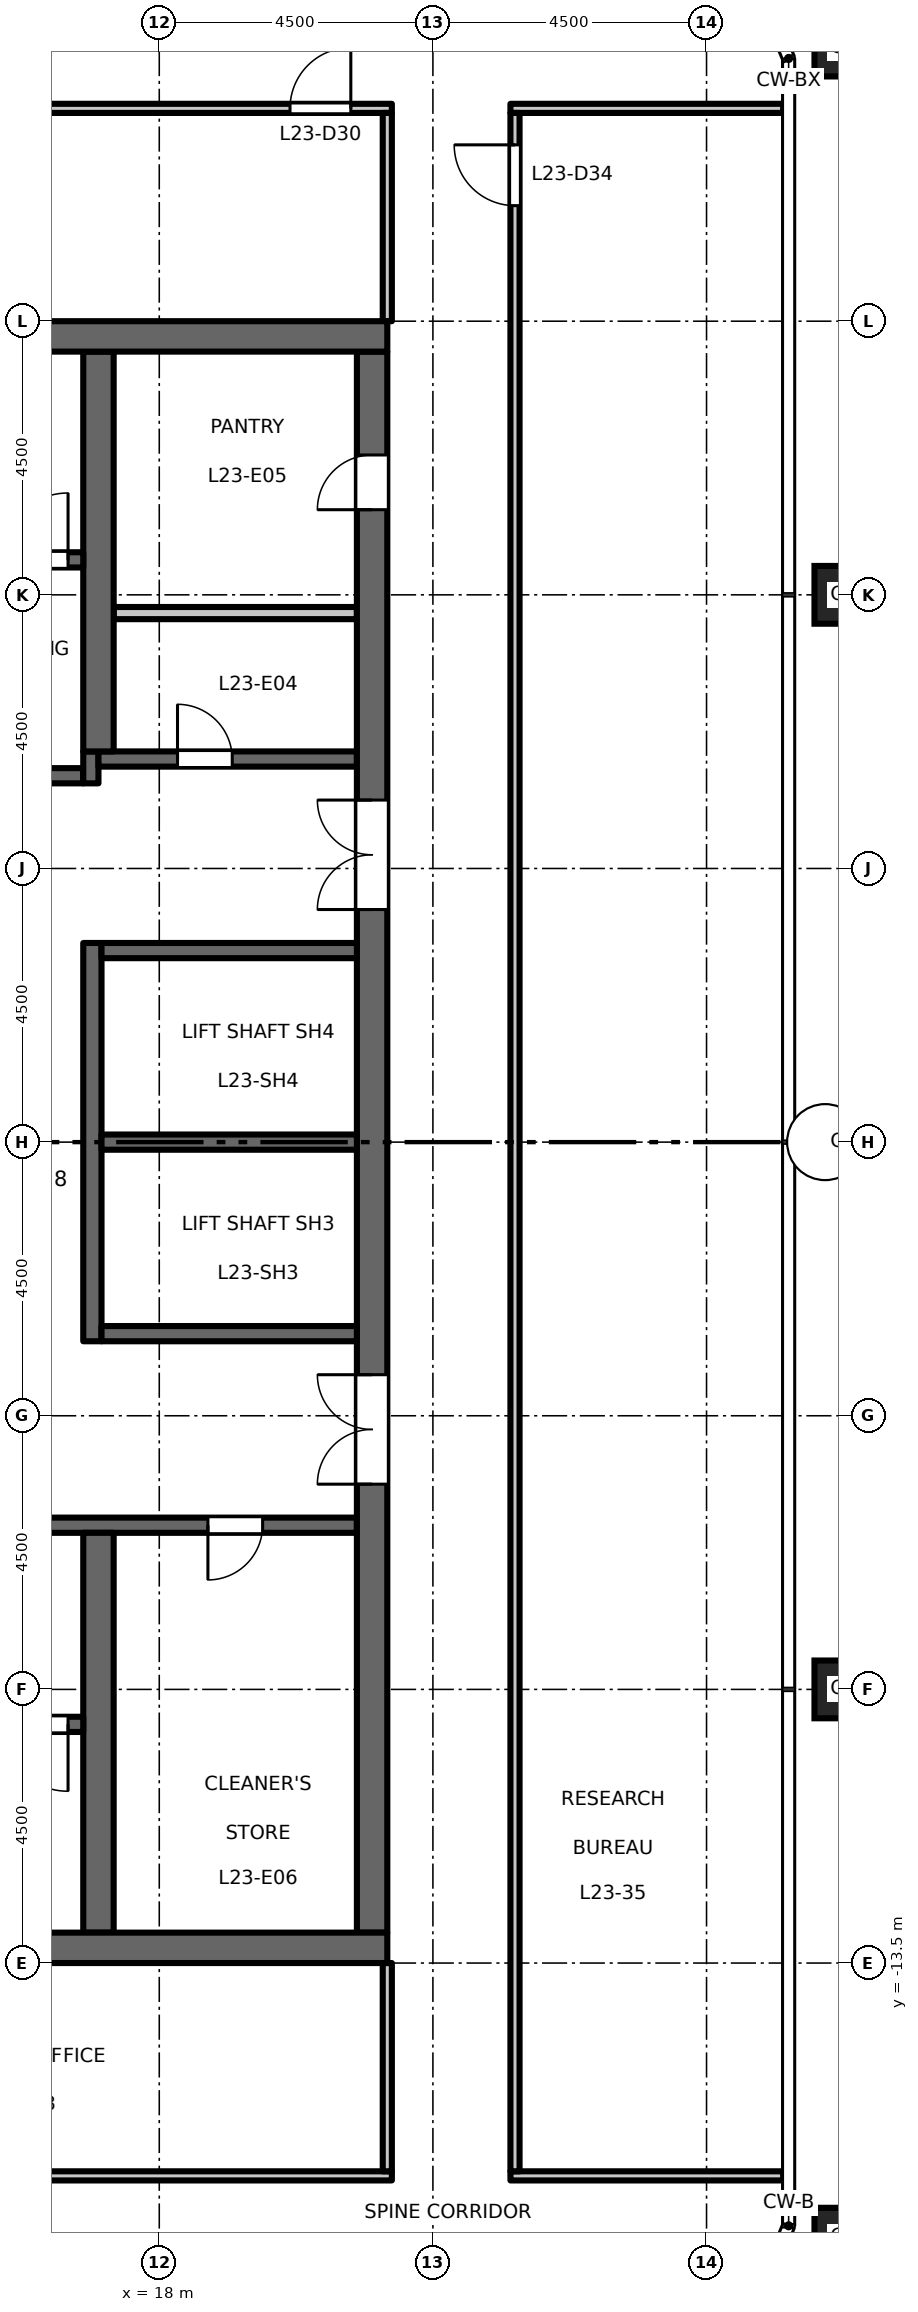
"""IFC4 building model, lengths in metres.
Left out: names, types, materials, properties, quantities, classifications, styles, units other than length and angle.
Written with IfcOpenShell. Run it as: python <this file> out.ifc"""

import sys

from ifc_helpers import new_model, si_unit, direction, frame, frame_2d, origin, origin_2d, place, context, subcontext, project, spatial, rectangle, hollow_rectangle, extrude, element, fill, save


model = new_model("IFC4")
c1 = context("Model", 3, precision=1e-05, world=origin(), true_north=direction((0.0, 1.0)))
c2 = subcontext(c1, "Body", "Model", "MODEL_VIEW")
j1 = project(units=[si_unit("LENGTHUNIT", "METRE"), si_unit("PLANEANGLEUNIT", "RADIAN")], contexts=[c1])
p1 = place(None, origin())
s1 = spatial("IfcSite", under=j1, at=p1, CompositionType="ELEMENT")
p2 = place(p1, origin())
s2 = spatial("IfcBuilding", under=s1, at=p2, CompositionType="ELEMENT")
p3 = place(p2, frame((0.0, 0.0, 109.2)))
s3 = spatial("IfcBuildingStorey", under=s2, at=p3, CompositionType="ELEMENT", Elevation=109.2)
for number, where, z_axis, x_axis in (
    (1, (29.25, -18.0, 0.0), (0.0, 0.0, 1.0), (1.0, 0.0, 0.0)),
    (2, (29.25, -9.0, 0.0), (0.0, 0.0, 1.0), (1.0, 0.0, 0.0)),
    (3, (29.25, 0.0, 0.0), (0.0, 0.0, 1.0), (1.0, 0.0, 0.0)),
    (4, (29.25, 9.0, 0.0), (0.0, 0.0, 1.0), (1.0, 0.0, 0.0)),
    (5, (29.25, 18.0, 0.0), (0.0, 0.0, 1.0), (1.0, 0.0, 0.0)),
):
    element("IfcColumn", number, at=place(p3, frame(where, z_axis=z_axis, x_axis=x_axis)), inside=s3, PredefinedType="COLUMN", context=c2, shape_type="SweptSolid", body=[
        extrude(hollow_rectangle(XDim=0.95, YDim=0.95, WallThickness=0.055, at=origin_2d()), origin(), (0.0, 0.0, 1.0), 4.5),
    ])
p4 = place(p3, frame((12.15, 6.025, 0.0), z_axis=(0.0, 0.0, 1.0), x_axis=(1.0, 0.0, 0.0)))
e6 = element("IfcWall", 6, at=p4, inside=s3, PredefinedType="SHEAR", context=c2, shape_type="SweptSolid", body=[
    extrude(rectangle(XDim=4.6, YDim=0.25, at=frame_2d((2.3, 0.0))), origin(), (0.0, 0.0, 1.0), 4.35),
])
p5 = place(p4, frame((1.8, 0.0, 0.0)))
e7 = element("IfcOpeningElement", 7, at=p5, cuts=e6, PredefinedType="OPENING", context=c2, shape_type="SweptSolid", body=[
    extrude(rectangle(XDim=1.0, YDim=2.1, at=frame_2d((0.5, 1.05))), frame((0.0, 0.135, 0.0), z_axis=(0.0, -1.0, 0.0), x_axis=(1.0, 0.0, 0.0)), (0.0, 0.0, 1.0), 0.27),
])
p6 = place(p3, frame((16.875, 5.9, 0.0), z_axis=(0.0, 0.0, 1.0), x_axis=(0.0, 1.0, 0.0)))
e8 = element("IfcWall", 8, at=p6, inside=s3, PredefinedType="SHEAR", context=c2, shape_type="SweptSolid", body=[
    extrude(rectangle(XDim=0.525, YDim=0.25, at=frame_2d((0.263, 0.0))), origin(), (0.0, 0.0, 1.0), 4.35),
])
p7 = place(p3, frame((17.0, 6.3, 0.0), z_axis=(0.0, 0.0, 1.0), x_axis=(1.0, 0.0, 0.0)))
e9 = element("IfcWall", 9, at=p7, inside=s3, PredefinedType="SHEAR", context=c2, shape_type="SweptSolid", body=[
    extrude(rectangle(XDim=4.25, YDim=0.25, at=frame_2d((2.125, 0.0))), origin(), (0.0, 0.0, 1.0), 4.35),
])
p8 = place(p7, frame((1.3, 0.0, 0.0)))
e10 = element("IfcOpeningElement", 10, at=p8, cuts=e9, PredefinedType="OPENING", context=c2, shape_type="SweptSolid", body=[
    extrude(rectangle(XDim=0.9, YDim=2.1, at=frame_2d((0.45, 1.05))), frame((0.0, 0.135, 0.0), z_axis=(0.0, -1.0, 0.0), x_axis=(1.0, 0.0, 0.0)), (0.0, 0.0, 1.0), 0.27),
])
p9 = place(p3, frame((12.15, -6.3, 0.0), z_axis=(0.0, 0.0, 1.0), x_axis=(1.0, 0.0, 0.0)))
e11 = element("IfcWall", 11, at=p9, inside=s3, PredefinedType="SHEAR", context=c2, shape_type="SweptSolid", body=[
    extrude(rectangle(XDim=9.1, YDim=0.25, at=frame_2d((4.55, 0.0))), origin(), (0.0, 0.0, 1.0), 4.35),
])
p10 = place(p9, frame((1.8, 0.0, 0.0)))
e12 = element("IfcOpeningElement", 12, at=p10, cuts=e11, PredefinedType="OPENING", context=c2, shape_type="SweptSolid", body=[
    extrude(rectangle(XDim=1.0, YDim=2.1, at=frame_2d((0.5, 1.05))), frame((0.0, 0.135, 0.0), z_axis=(0.0, -1.0, 0.0), x_axis=(1.0, 0.0, 0.0)), (0.0, 0.0, 1.0), 0.27),
])
p11 = place(p9, frame((6.65, 0.0, 0.0)))
e13 = element("IfcOpeningElement", 13, at=p11, cuts=e11, PredefinedType="OPENING", context=c2, shape_type="SweptSolid", body=[
    extrude(rectangle(XDim=0.9, YDim=2.1, at=frame_2d((0.45, 1.05))), frame((0.0, 0.135, 0.0), z_axis=(0.0, -1.0, 0.0), x_axis=(1.0, 0.0, 0.0)), (0.0, 0.0, 1.0), 0.27),
])
p12 = place(p3, frame((21.5, -13.0, 0.0), z_axis=(0.0, 0.0, 1.0), x_axis=(0.0, 1.0, 0.0)))
e14 = element("IfcWall", 14, at=p12, inside=s3, PredefinedType="SHEAR", context=c2, shape_type="SweptSolid", body=[
    extrude(rectangle(XDim=26.0, YDim=0.5, at=frame_2d((13.0, 0.0))), origin(), (0.0, 0.0, 1.0), 4.35),
])
p13 = place(p12, frame((16.825, 0.0, 0.0)))
e15 = element("IfcOpeningElement", 15, at=p13, cuts=e14, PredefinedType="OPENING", context=c2, shape_type="SweptSolid", body=[
    extrude(rectangle(XDim=1.8, YDim=2.1, at=frame_2d((0.9, 1.05))), frame((0.0, 0.26, 0.0), z_axis=(0.0, -1.0, 0.0), x_axis=(1.0, 0.0, 0.0)), (0.0, 0.0, 1.0), 0.52),
])
p14 = place(p12, frame((7.375, 0.0, 0.0)))
e16 = element("IfcOpeningElement", 16, at=p14, cuts=e14, PredefinedType="OPENING", context=c2, shape_type="SweptSolid", body=[
    extrude(rectangle(XDim=1.8, YDim=2.1, at=frame_2d((0.9, 1.05))), frame((0.0, 0.26, 0.0), z_axis=(0.0, -1.0, 0.0), x_axis=(1.0, 0.0, 0.0)), (0.0, 0.0, 1.0), 0.52),
])
p15 = place(p12, frame((23.4, 0.0, 0.0)))
e17 = element("IfcOpeningElement", 17, at=p15, cuts=e14, PredefinedType="OPENING", context=c2, shape_type="SweptSolid", body=[
    extrude(rectangle(XDim=0.9, YDim=2.1, at=frame_2d((0.45, 1.05))), frame((0.0, 0.26, 0.0), z_axis=(0.0, -1.0, 0.0), x_axis=(1.0, 0.0, 0.0)), (0.0, 0.0, 1.0), 0.52),
])
p16 = place(p3, frame((17.25, 8.7, 0.0), z_axis=(0.0, 0.0, 1.0), x_axis=(1.0, 0.0, 0.0)))
e18 = element("IfcWall", 18, at=p16, inside=s3, PredefinedType="PARTITIONING", context=c2, shape_type="SweptSolid", body=[
    extrude(rectangle(XDim=4.0, YDim=0.2, at=frame_2d((2.0, 0.0))), origin(), (0.0, 0.0, 1.0), 4.35),
])
p17 = place(p3, frame((16.9, -3.275, 0.0), z_axis=(0.0, 0.0, 1.0), x_axis=(0.0, 1.0, 0.0)))
e19 = element("IfcWall", 19, at=p17, inside=s3, PredefinedType="SHEAR", context=c2, shape_type="SweptSolid", body=[
    extrude(rectangle(XDim=6.55, YDim=0.3, at=frame_2d((3.275, 0.0))), origin(), (0.0, 0.0, 1.0), 4.35),
])
for number, where, z_axis, x_axis in (
    (20, (17.05, 0.0, 0.0), (0.0, 0.0, 1.0), (1.0, 0.0, 0.0)),
    (21, (17.05, 3.15, 0.0), (0.0, 0.0, 1.0), (1.0, 0.0, 0.0)),
    (22, (17.05, -3.15, 0.0), (0.0, 0.0, 1.0), (1.0, 0.0, 0.0)),
):
    element("IfcWall", number, at=place(p3, frame(where, z_axis=z_axis, x_axis=x_axis)), inside=s3, PredefinedType="SHEAR", context=c2, shape_type="SweptSolid", body=[
        extrude(rectangle(XDim=4.2, YDim=0.25, at=frame_2d((2.1, 0.0))), origin(), (0.0, 0.0, 1.0), 4.35),
    ])
for number, where, z_axis, x_axis in (
    (23, (17.0, 6.425, 0.0), (0.0, 0.0, 1.0), (0.0, 1.0, 0.0)),
    (24, (17.0, -13.0, 0.0), (0.0, 0.0, 1.0), (0.0, 1.0, 0.0)),
):
    element("IfcWall", number, at=place(p3, frame(where, z_axis=z_axis, x_axis=x_axis)), inside=s3, PredefinedType="SHEAR", context=c2, shape_type="SweptSolid", body=[
        extrude(rectangle(XDim=6.575, YDim=0.5, at=frame_2d((3.288, 0.0))), origin(), (0.0, 0.0, 1.0), 4.35),
    ])
p18 = place(p3, frame((8.75, 9.575, 0.0), z_axis=(0.0, 0.0, 1.0), x_axis=(1.0, 0.0, 0.0)))
e25 = element("IfcWall", 25, at=p18, inside=s3, PredefinedType="SHEAR", context=c2, shape_type="SweptSolid", body=[
    extrude(rectangle(XDim=8.0, YDim=0.25, at=frame_2d((4.0, 0.0))), origin(), (0.0, 0.0, 1.0), 4.35),
])
p19 = place(p18, frame((6.65, 0.0, 0.0)))
e26 = element("IfcOpeningElement", 26, at=p19, cuts=e25, PredefinedType="OPENING", context=c2, shape_type="SweptSolid", body=[
    extrude(rectangle(XDim=1.1, YDim=2.1, at=frame_2d((0.55, 1.05))), frame((0.0, 0.135, 0.0), z_axis=(0.0, -1.0, 0.0), x_axis=(1.0, 0.0, 0.0)), (0.0, 0.0, 1.0), 0.27),
])
p20 = place(p3, frame((8.75, -9.575, 0.0), z_axis=(0.0, 0.0, 1.0), x_axis=(1.0, 0.0, 0.0)))
e27 = element("IfcWall", 27, at=p20, inside=s3, PredefinedType="SHEAR", context=c2, shape_type="SweptSolid", body=[
    extrude(rectangle(XDim=8.0, YDim=0.25, at=frame_2d((4.0, 0.0))), origin(), (0.0, 0.0, 1.0), 4.35),
])
p21 = place(p20, frame((6.65, 0.0, 0.0)))
e28 = element("IfcOpeningElement", 28, at=p21, cuts=e27, PredefinedType="OPENING", context=c2, shape_type="SweptSolid", body=[
    extrude(rectangle(XDim=1.1, YDim=2.1, at=frame_2d((0.55, 1.05))), frame((0.0, 0.135, 0.0), z_axis=(0.0, -1.0, 0.0), x_axis=(1.0, 0.0, 0.0)), (0.0, 0.0, 1.0), 0.27),
])
for number, where, z_axis, x_axis in (
    (29, (8.25, 13.25, 0.0), (0.0, 0.0, 1.0), (1.0, 0.0, 0.0)),
    (30, (8.25, -13.25, 0.0), (0.0, 0.0, 1.0), (1.0, 0.0, 0.0)),
):
    element("IfcWall", number, at=place(p3, frame(where, z_axis=z_axis, x_axis=x_axis)), inside=s3, PredefinedType="SHEAR", context=c2, shape_type="SweptSolid", body=[
        extrude(rectangle(XDim=13.5, YDim=0.5, at=frame_2d((6.75, 0.0))), origin(), (0.0, 0.0, 1.0), 4.35),
    ])
p22 = place(p3, frame((-21.825, -17.0, 0.0), z_axis=(0.0, 0.0, 1.0), x_axis=(1.0, 0.0, 0.0)))
e31 = element("IfcWall", 31, at=p22, inside=s3, PredefinedType="PARTITIONING", context=c2, shape_type="SweptSolid", body=[
    extrude(rectangle(XDim=43.65, YDim=0.15, at=frame_2d((21.825, 0.0))), origin(), (0.0, 0.0, 1.0), 4.35),
])
p23 = place(p22, frame((14.175, 0.0, 0.0)))
e32 = element("IfcOpeningElement", 32, at=p23, cuts=e31, PredefinedType="OPENING", context=c2, shape_type="SweptSolid", body=[
    extrude(rectangle(XDim=1.0, YDim=2.1, at=frame_2d((0.5, 1.05))), frame((0.0, 0.085, 0.0), z_axis=(0.0, -1.0, 0.0), x_axis=(1.0, 0.0, 0.0)), (0.0, 0.0, 1.0), 0.17),
])
p24 = place(p22, frame((11.925, 0.0, 0.0)))
e33 = element("IfcOpeningElement", 33, at=p24, cuts=e31, PredefinedType="OPENING", context=c2, shape_type="SweptSolid", body=[
    extrude(rectangle(XDim=1.0, YDim=2.1, at=frame_2d((0.5, 1.05))), frame((0.0, 0.085, 0.0), z_axis=(0.0, -1.0, 0.0), x_axis=(1.0, 0.0, 0.0)), (0.0, 0.0, 1.0), 0.17),
])
p25 = place(p22, frame((30.675, 0.0, 0.0)))
e34 = element("IfcOpeningElement", 34, at=p25, cuts=e31, PredefinedType="OPENING", context=c2, shape_type="SweptSolid", body=[
    extrude(rectangle(XDim=1.0, YDim=2.1, at=frame_2d((0.5, 1.05))), frame((0.0, 0.085, 0.0), z_axis=(0.0, -1.0, 0.0), x_axis=(1.0, 0.0, 0.0)), (0.0, 0.0, 1.0), 0.17),
])
p26 = place(p3, frame((23.775, -17.0, 0.0), z_axis=(0.0, 0.0, 1.0), x_axis=(1.0, 0.0, 0.0)))
e35 = element("IfcWall", 35, at=p26, inside=s3, PredefinedType="PARTITIONING", context=c2, shape_type="SweptSolid", body=[
    extrude(rectangle(XDim=4.485, YDim=0.15, at=frame_2d((2.243, 0.0))), origin(), (0.0, 0.0, 1.0), 4.35),
])
p27 = place(p3, frame((-21.825, 17.0, 0.0), z_axis=(0.0, 0.0, 1.0), x_axis=(1.0, 0.0, 0.0)))
e36 = element("IfcWall", 36, at=p27, inside=s3, PredefinedType="PARTITIONING", context=c2, shape_type="SweptSolid", body=[
    extrude(rectangle(XDim=43.65, YDim=0.15, at=frame_2d((21.825, 0.0))), origin(), (0.0, 0.0, 1.0), 4.35),
])
p28 = place(p27, frame((20.225, 0.0, 0.0)))
e37 = element("IfcOpeningElement", 37, at=p28, cuts=e36, PredefinedType="OPENING", context=c2, shape_type="SweptSolid", body=[
    extrude(rectangle(XDim=1.0, YDim=2.1, at=frame_2d((0.5, 1.05))), frame((0.0, 0.085, 0.0), z_axis=(0.0, -1.0, 0.0), x_axis=(1.0, 0.0, 0.0)), (0.0, 0.0, 1.0), 0.17),
])
p29 = place(p27, frame((22.475, 0.0, 0.0)))
e38 = element("IfcOpeningElement", 38, at=p29, cuts=e36, PredefinedType="OPENING", context=c2, shape_type="SweptSolid", body=[
    extrude(rectangle(XDim=1.0, YDim=2.1, at=frame_2d((0.5, 1.05))), frame((0.0, 0.085, 0.0), z_axis=(0.0, -1.0, 0.0), x_axis=(1.0, 0.0, 0.0)), (0.0, 0.0, 1.0), 0.17),
])
p30 = place(p27, frame((0.725, 0.0, 0.0)))
e39 = element("IfcOpeningElement", 39, at=p30, cuts=e36, PredefinedType="OPENING", context=c2, shape_type="SweptSolid", body=[
    extrude(rectangle(XDim=1.0, YDim=2.1, at=frame_2d((0.5, 1.05))), frame((0.0, 0.085, 0.0), z_axis=(0.0, -1.0, 0.0), x_axis=(1.0, 0.0, 0.0)), (0.0, 0.0, 1.0), 0.17),
])
p31 = place(p27, frame((41.975, 0.0, 0.0)))
e40 = element("IfcOpeningElement", 40, at=p31, cuts=e36, PredefinedType="OPENING", context=c2, shape_type="SweptSolid", body=[
    extrude(rectangle(XDim=1.0, YDim=2.1, at=frame_2d((0.5, 1.05))), frame((0.0, 0.085, 0.0), z_axis=(0.0, -1.0, 0.0), x_axis=(1.0, 0.0, 0.0)), (0.0, 0.0, 1.0), 0.17),
])
p32 = place(p3, frame((23.775, 17.0, 0.0), z_axis=(0.0, 0.0, 1.0), x_axis=(1.0, 0.0, 0.0)))
e41 = element("IfcWall", 41, at=p32, inside=s3, PredefinedType="PARTITIONING", context=c2, shape_type="SweptSolid", body=[
    extrude(rectangle(XDim=4.485, YDim=0.15, at=frame_2d((2.243, 0.0))), origin(), (0.0, 0.0, 1.0), 4.35),
])
for number, where, z_axis, x_axis in (
    (42, (21.75, -16.925, 0.0), (0.0, 0.0, 1.0), (0.0, 1.0, 0.0)),
    (43, (21.75, 13.5, 0.0), (0.0, 0.0, 1.0), (0.0, 1.0, 0.0)),
):
    element("IfcWall", number, at=place(p3, frame(where, z_axis=z_axis, x_axis=x_axis)), inside=s3, PredefinedType="PARTITIONING", context=c2, shape_type="SweptSolid", body=[
        extrude(rectangle(XDim=3.425, YDim=0.15, at=frame_2d((1.712, 0.0))), origin(), (0.0, 0.0, 1.0), 4.35),
    ])
p33 = place(p3, frame((23.85, -16.925, 0.0), z_axis=(0.0, 0.0, 1.0), x_axis=(0.0, 1.0, 0.0)))
e44 = element("IfcWall", 44, at=p33, inside=s3, PredefinedType="PARTITIONING", context=c2, shape_type="SweptSolid", body=[
    extrude(rectangle(XDim=33.85, YDim=0.15, at=frame_2d((16.925, 0.0))), origin(), (0.0, 0.0, 1.0), 4.35),
])
p34 = place(p33, frame((32.325, 0.0, 0.0)))
e45 = element("IfcOpeningElement", 45, at=p34, cuts=e44, PredefinedType="OPENING", context=c2, shape_type="SweptSolid", body=[
    extrude(rectangle(XDim=1.0, YDim=2.1, at=frame_2d((0.5, 1.05))), frame((0.0, 0.085, 0.0), z_axis=(0.0, -1.0, 0.0), x_axis=(1.0, 0.0, 0.0)), (0.0, 0.0, 1.0), 0.17),
])
p35 = place(p19, origin())
e46 = element("IfcDoor", 46, at=p35, inside=s3, OperationType="SINGLE_SWING_LEFT", PredefinedType="DOOR", context=c2, shape_type="SweptSolid", body=[
    extrude(rectangle(XDim=1.1, YDim=2.1, at=frame_2d((0.55, 1.05))), frame((0.0, 0.025, 0.0), z_axis=(0.0, -1.0, 0.0), x_axis=(1.0, 0.0, 0.0)), (0.0, 0.0, 1.0), 0.05),
])
fill(e26, e46)
p36 = place(p21, origin())
e47 = element("IfcDoor", 47, at=p36, inside=s3, OperationType="SINGLE_SWING_RIGHT", PredefinedType="DOOR", context=c2, shape_type="SweptSolid", body=[
    extrude(rectangle(XDim=1.1, YDim=2.1, at=frame_2d((0.55, 1.05))), frame((0.0, 0.025, 0.0), z_axis=(0.0, -1.0, 0.0), x_axis=(1.0, 0.0, 0.0)), (0.0, 0.0, 1.0), 0.05),
])
fill(e28, e47)
p37 = place(p13, origin())
e48 = element("IfcDoor", 48, at=p37, inside=s3, OperationType="DOUBLE_DOOR_DOUBLE_SWING", PredefinedType="DOOR", context=c2, shape_type="SweptSolid", body=[
    extrude(rectangle(XDim=1.8, YDim=2.1, at=frame_2d((0.9, 1.05))), frame((0.0, 0.025, 0.0), z_axis=(0.0, -1.0, 0.0), x_axis=(1.0, 0.0, 0.0)), (0.0, 0.0, 1.0), 0.05),
])
fill(e15, e48)
p38 = place(p14, origin())
e49 = element("IfcDoor", 49, at=p38, inside=s3, OperationType="DOUBLE_DOOR_DOUBLE_SWING", PredefinedType="DOOR", context=c2, shape_type="SweptSolid", body=[
    extrude(rectangle(XDim=1.8, YDim=2.1, at=frame_2d((0.9, 1.05))), frame((0.0, 0.025, 0.0), z_axis=(0.0, -1.0, 0.0), x_axis=(1.0, 0.0, 0.0)), (0.0, 0.0, 1.0), 0.05),
])
fill(e16, e49)
p39 = place(p8, origin())
e50 = element("IfcDoor", 50, at=p39, inside=s3, OperationType="SINGLE_SWING_RIGHT", PredefinedType="DOOR", context=c2, shape_type="SweptSolid", body=[
    extrude(rectangle(XDim=0.9, YDim=2.1, at=frame_2d((0.45, 1.05))), frame((0.0, 0.025, 0.0), z_axis=(0.0, -1.0, 0.0), x_axis=(1.0, 0.0, 0.0)), (0.0, 0.0, 1.0), 0.05),
])
fill(e10, e50)
p40 = place(p15, origin())
e51 = element("IfcDoor", 51, at=p40, inside=s3, OperationType="SINGLE_SWING_RIGHT", PredefinedType="DOOR", context=c2, shape_type="SweptSolid", body=[
    extrude(rectangle(XDim=0.9, YDim=2.1, at=frame_2d((0.45, 1.05))), frame((0.0, 0.025, 0.0), z_axis=(0.0, -1.0, 0.0), x_axis=(1.0, 0.0, 0.0)), (0.0, 0.0, 1.0), 0.05),
])
fill(e17, e51)
p41 = place(p11, origin())
e52 = element("IfcDoor", 52, at=p41, inside=s3, OperationType="SINGLE_SWING_LEFT", PredefinedType="DOOR", context=c2, shape_type="SweptSolid", body=[
    extrude(rectangle(XDim=0.9, YDim=2.1, at=frame_2d((0.45, 1.05))), frame((0.0, 0.025, 0.0), z_axis=(0.0, -1.0, 0.0), x_axis=(1.0, 0.0, 0.0)), (0.0, 0.0, 1.0), 0.05),
])
fill(e13, e52)
p42 = place(p31, origin())
e53 = element("IfcDoor", 53, at=p42, inside=s3, OperationType="SINGLE_SWING_RIGHT", PredefinedType="DOOR", context=c2, shape_type="SweptSolid", body=[
    extrude(rectangle(XDim=1.0, YDim=2.1, at=frame_2d((0.5, 1.05))), frame((0.0, 0.025, 0.0), z_axis=(0.0, -1.0, 0.0), x_axis=(1.0, 0.0, 0.0)), (0.0, 0.0, 1.0), 0.05),
])
fill(e40, e53)
p43 = place(p34, origin())
e54 = element("IfcDoor", 54, at=p43, inside=s3, OperationType="SINGLE_SWING_RIGHT", PredefinedType="DOOR", context=c2, shape_type="SweptSolid", body=[
    extrude(rectangle(XDim=1.0, YDim=2.1, at=frame_2d((0.5, 1.05))), frame((0.0, 0.025, 0.0), z_axis=(0.0, -1.0, 0.0), x_axis=(1.0, 0.0, 0.0)), (0.0, 0.0, 1.0), 0.05),
])
fill(e45, e54)
save(model, sys.argv[1])
